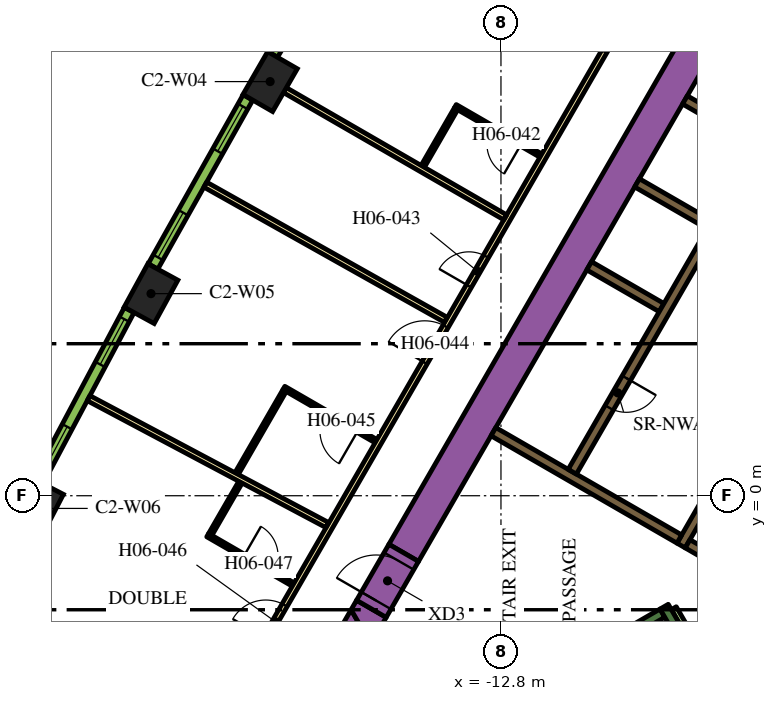
"""IFC4 building model, lengths in metres.
Left out: names, types, materials, properties, quantities, classifications, styles, units other than length and angle.
Written with IfcOpenShell. Run it as: python <this file> out.ifc"""

import sys

from ifc_helpers import new_model, si_unit, direction, frame, frame_2d, origin, origin_2d, place, context, subcontext, project, spatial, polyline, rectangle, outline, extrude, element, fill, save


model = new_model("IFC4")
c1 = context("Model", 3, precision=1e-05, world=origin(), true_north=direction((0.0, 1.0)))
c2 = subcontext(c1, "Body", "Model", "MODEL_VIEW")
j1 = project(units=[si_unit("LENGTHUNIT", "METRE"), si_unit("PLANEANGLEUNIT", "RADIAN")], contexts=[c1])
p1 = place(None, origin())
s1 = spatial("IfcSite", under=j1, at=p1, CompositionType="ELEMENT")
p2 = place(p1, origin())
s2 = spatial("IfcBuilding", under=s1, at=p2, CompositionType="ELEMENT")
p3 = place(p2, frame((0.0, 0.0, 91.5)))
s3 = spatial("IfcBuildingStorey", under=s2, at=p3, CompositionType="ELEMENT", Elevation=91.5)
for number, where, z_axis, x_axis in (
    (1, (-18.874, 10.897, 0.0), (0.0, 0.0, 1.0), (-0.5, -0.866, 0.0)),
    (2, (-22.009, 5.317, 0.0), (0.0, 0.0, 1.0), (-0.48, -0.877, 0.0)),
    (3, (-25.012, -0.334, 0.0), (0.0, 0.0, 1.0), (-0.459, -0.888, 0.0)),
):
    element("IfcColumn", number, at=place(p3, frame(where, z_axis=z_axis, x_axis=x_axis)), inside=s3, PredefinedType="COLUMN", context=c2, shape_type="SweptSolid", body=[
        extrude(rectangle(XDim=1.3, YDim=0.9, at=origin_2d()), origin(), (0.0, 0.0, 1.0), 3.9),
    ])
p4 = place(p3, frame((-15.36, -1.503, 0.0), z_axis=(0.0, 0.0, 1.0), x_axis=(0.50000389221, 0.866023156604, 0.0)))
e4 = element("IfcWall", 4, at=p4, inside=s3, PredefinedType="SOLIDWALL", context=c2, shape_type="SweptSolid", body=[
    extrude(rectangle(XDim=21.0, YDim=0.9, at=frame_2d((10.5, 0.0))), origin(), (0.0, 0.0, 1.0), 3.9),
])
p5 = place(p3, origin())
e5 = element("IfcWall", 5, at=p5, inside=s3, PredefinedType="SOLIDWALL", context=c2, shape_type="SweptSolid", body=[
    extrude(outline(polyline([(-16.489, -3.44), (-17.251, -3.88), (-16.743, -3.0), (-16.489, -3.44)])), origin(), (0.0, 0.0, 1.0), 3.9),
])
e6 = element("IfcWall", 6, at=p5, inside=s3, PredefinedType="SOLIDWALL", context=c2, shape_type="SweptSolid", body=[
    extrude(outline(polyline([(-15.82, -3.201), (-16.223, -3.9), (-16.743, -3.0), (-16.599, -2.751), (-15.82, -3.201)])), origin(), (0.0, 0.0, 1.0), 3.9),
])
p6 = place(p3, frame((-14.44, -6.49, 0.0), z_axis=(0.0, 0.0, 1.0), x_axis=(0.866022966069, 0.500004222222, 0.0)))
e7 = element("IfcWall", 7, at=p6, inside=s3, PredefinedType="SOLIDWALL", context=c2, shape_type="SweptSolid", body=[
    extrude(rectangle(XDim=6.8, YDim=0.25, at=frame_2d((3.4, 0.0))), origin(), (0.0, 0.0, 1.0), 3.9),
])
p7 = place(p3, frame((-8.168, -3.503, 0.0), z_axis=(0.0, 0.0, 1.0), x_axis=(-0.499952099219, 0.866053057547, 0.0)))
e8 = element("IfcWall", 8, at=p7, inside=s3, PredefinedType="SOLIDWALL", context=c2, shape_type="SweptSolid", body=[
    extrude(rectangle(XDim=0.675, YDim=0.25, at=frame_2d((0.337, 0.0))), origin(), (0.0, 0.0, 1.0), 3.9),
])
p8 = place(p3, frame((-8.06, -1.311, 0.0), z_axis=(0.0, 0.0, 1.0), x_axis=(0.50000273126, 0.866023826885, 0.0)))
e9 = element("IfcWall", 9, at=p8, inside=s3, PredefinedType="SOLIDWALL", context=c2, shape_type="SweptSolid", body=[
    extrude(rectangle(XDim=10.33, YDim=0.25, at=frame_2d((5.165, 0.0))), origin(), (0.0, 0.0, 1.0), 3.9),
])
e10 = element("IfcWall", 10, at=p5, inside=s3, PredefinedType="SOLIDWALL", context=c2, shape_type="SweptSolid", body=[
    extrude(outline(polyline([(-5.922, -2.257), (-5.922, -2.257), (-5.705, -2.382), (-5.83, -2.598), (-6.483, -2.221), (-6.591, -2.033), (-6.591, -2.033), (-6.7, -2.096), (-7.952, -1.373), (-7.827, -1.156), (-5.922, -2.257)])), origin(), (0.0, 0.0, 1.0), 3.9),
])
p9 = place(p3, frame((-8.106, -1.14, 0.0), z_axis=(0.0, 0.0, 1.0), x_axis=(-0.866000643155, 0.500042884217, 0.0)))
e11 = element("IfcWall", 11, at=p9, inside=s3, PredefinedType="SOLIDWALL", context=c2, shape_type="SweptSolid", body=[
    extrude(rectangle(XDim=5.65, YDim=0.25, at=frame_2d((2.825, 0.0))), origin(), (0.0, 0.0, 1.0), 3.9),
])
for number, where, z_axis, x_axis in (
    (12, (-8.574, 4.95, 0.0), (0.0, 0.0, 1.0), (-0.866, 0.5, 0.0)),
    (13, (-7.314, 7.132, 0.0), (0.0, 0.0, 1.0), (-0.866, 0.5, 0.0)),
):
    element("IfcWall", number, at=place(p3, frame(where, z_axis=z_axis, x_axis=x_axis)), inside=s3, PredefinedType="SOLIDWALL", context=c2, shape_type="SweptSolid", body=[
        extrude(rectangle(XDim=2.2, YDim=0.25, at=frame_2d((1.1, 0.0))), origin(), (0.0, 0.0, 1.0), 3.9),
    ])
p10 = place(p3, frame((-7.959, 10.415, 0.0), z_axis=(0.0, 0.0, 1.0), x_axis=(0.866020958405, -0.500007699544, 0.0)))
e14 = element("IfcWall", 14, at=p10, inside=s3, PredefinedType="SOLIDWALL", context=c2, shape_type="SweptSolid", body=[
    extrude(rectangle(XDim=4.1, YDim=0.25, at=frame_2d((2.05, 0.0))), origin(), (0.0, 0.0, 1.0), 3.9),
])
p11 = place(p3, frame((-8.252, -2.958, 0.0), z_axis=(0.0, 0.0, 1.0), x_axis=(0.500174715838, -0.865924508047, 0.0)))
e15 = element("IfcWall", 15, at=p11, inside=s3, PredefinedType="PARTITIONING", context=c2, shape_type="SweptSolid", body=[
    extrude(rectangle(XDim=0.514, YDim=0.15, at=frame_2d((0.257, 0.0))), origin(), (0.0, 0.0, 1.0), 2.75),
])
p12 = place(p3, frame((-6.008, 9.144, 0.0), z_axis=(0.0, 0.0, 1.0), x_axis=(-0.500006956611, -0.866021387346, 0.0)))
e16 = element("IfcWall", 16, at=p12, inside=s3, PredefinedType="SOLIDWALL", context=c2, shape_type="SweptSolid", body=[
    extrude(rectangle(XDim=9.83, YDim=0.25, at=frame_2d((4.915, 0.0))), origin(), (0.0, 0.0, 1.0), 3.9),
])
p13 = place(p12, frame((6.985, 0.0, 0.0)))
e17 = element("IfcOpeningElement", 17, at=p13, cuts=e16, PredefinedType="OPENING", context=c2, shape_type="SweptSolid", body=[
    extrude(rectangle(XDim=0.9, YDim=2.1, at=frame_2d((0.45, 1.05))), frame((0.0, 0.135, 0.0), z_axis=(0.0, -1.0, 0.0), x_axis=(1.0, 0.0, 0.0)), (0.0, 0.0, 1.0), 0.27),
])
p14 = place(p3, frame((-16.209, -2.976, 0.0), z_axis=(0.0, 0.0, 1.0), x_axis=(0.499954529098, 0.86605165483, 0.0)))
e18 = element("IfcWall", 18, at=p14, inside=s3, PredefinedType="SOLIDWALL", context=c2, shape_type="SweptSolid", body=[
    extrude(rectangle(XDim=1.7, YDim=0.9, at=frame_2d((0.85, 0.0))), origin(), (0.0, 0.0, 1.0), 3.9),
])
p15 = place(p14, frame((0.25, 0.0, 0.0)))
e19 = element("IfcOpeningElement", 19, at=p15, cuts=e18, PredefinedType="OPENING", context=c2, shape_type="SweptSolid", body=[
    extrude(rectangle(XDim=1.2, YDim=2.1, at=frame_2d((0.6, 1.05))), frame((0.0, 0.46, 0.0), z_axis=(0.0, -1.0, 0.0), x_axis=(1.0, 0.0, 0.0)), (0.0, 0.0, 1.0), 0.92),
])
p16 = place(p3, frame((-19.081, -3.9, 0.0), z_axis=(0.0, 0.0, 1.0), x_axis=(0.499998313975, 0.866026377209, 0.0)))
e20 = element("IfcWall", 20, at=p16, inside=s3, PredefinedType="PARTITIONING", context=c2, shape_type="SweptSolid", body=[
    extrude(rectangle(XDim=25.766, YDim=0.15, at=frame_2d((12.883, 0.0))), origin(), (0.0, 0.0, 1.0), 2.75),
])
p17 = place(p16, frame((19.306, 0.0, 0.0)))
e21 = element("IfcOpeningElement", 21, at=p17, cuts=e20, PredefinedType="OPENING", context=c2, shape_type="SweptSolid", body=[
    extrude(rectangle(XDim=1.0, YDim=2.1, at=frame_2d((0.5, 1.05))), frame((0.0, 0.085, 0.0), z_axis=(0.0, -1.0, 0.0), x_axis=(1.0, 0.0, 0.0)), (0.0, 0.0, 1.0), 0.17),
])
p18 = place(p16, frame((18.0, 0.0, 0.0)))
e22 = element("IfcOpeningElement", 22, at=p18, cuts=e20, PredefinedType="OPENING", context=c2, shape_type="SweptSolid", body=[
    extrude(rectangle(XDim=1.0, YDim=2.1, at=frame_2d((0.5, 1.05))), frame((0.0, 0.085, 0.0), z_axis=(0.0, -1.0, 0.0), x_axis=(1.0, 0.0, 0.0)), (0.0, 0.0, 1.0), 0.17),
])
p19 = place(p16, frame((10.874, 0.0, 0.0)))
e23 = element("IfcOpeningElement", 23, at=p19, cuts=e20, PredefinedType="OPENING", context=c2, shape_type="SweptSolid", body=[
    extrude(rectangle(XDim=0.9, YDim=2.1, at=frame_2d((0.45, 1.05))), frame((0.0, 0.085, 0.0), z_axis=(0.0, -1.0, 0.0), x_axis=(1.0, 0.0, 0.0)), (0.0, 0.0, 1.0), 0.17),
])
p20 = place(p16, frame((8.548, 0.0, 0.0)))
e24 = element("IfcOpeningElement", 24, at=p20, cuts=e20, PredefinedType="OPENING", context=c2, shape_type="SweptSolid", body=[
    extrude(rectangle(XDim=1.1, YDim=2.1, at=frame_2d((0.55, 1.05))), frame((0.0, 0.085, 0.0), z_axis=(0.0, -1.0, 0.0), x_axis=(1.0, 0.0, 0.0)), (0.0, 0.0, 1.0), 0.17),
])
p21 = place(p16, frame((0.18, 0.0, 0.0)))
e25 = element("IfcOpeningElement", 25, at=p21, cuts=e20, PredefinedType="OPENING", context=c2, shape_type="SweptSolid", body=[
    extrude(rectangle(XDim=1.0, YDim=2.1, at=frame_2d((0.5, 1.05))), frame((0.0, 0.085, 0.0), z_axis=(0.0, -1.0, 0.0), x_axis=(1.0, 0.0, 0.0)), (0.0, 0.0, 1.0), 0.17),
])
p22 = place(p3, frame((-23.652, 2.567, 0.0), z_axis=(0.0, 0.0, 1.0), x_axis=(0.883019237957, -0.469336793144, 0.0)))
e26 = element("IfcWall", 26, at=p22, inside=s3, PredefinedType="PARTITIONING", context=c2, shape_type="SweptSolid", body=[
    extrude(rectangle(XDim=7.111, YDim=0.15, at=frame_2d((3.555, 0.0))), origin(), (0.0, 0.0, 1.0), 2.75),
])
p23 = place(p3, frame((-26.591, -3.122, 0.0), z_axis=(0.0, 0.0, 1.0), x_axis=(0.893766213273, -0.448533115847, 0.0)))
e27 = element("IfcWall", 27, at=p23, inside=s3, PredefinedType="PARTITIONING", context=c2, shape_type="SweptSolid", body=[
    extrude(rectangle(XDim=10.875, YDim=0.15, at=frame_2d((5.438, 0.0))), origin(), (0.0, 0.0, 1.0), 2.75),
])
p24 = place(p3, frame((-20.581, 8.185, 0.0), z_axis=(0.0, 0.0, 1.0), x_axis=(0.871820720803, -0.489825102233, 0.0)))
e28 = element("IfcWall", 28, at=p24, inside=s3, PredefinedType="PARTITIONING", context=c2, shape_type="SweptSolid", body=[
    extrude(rectangle(XDim=7.257, YDim=0.15, at=frame_2d((3.628, 0.0))), origin(), (0.0, 0.0, 1.0), 2.75),
])
p25 = place(p3, frame((-18.484, 10.672, 0.0), z_axis=(0.0, 0.0, 1.0), x_axis=(0.866019162053, -0.50001081084, 0.0)))
e29 = element("IfcWall", 29, at=p25, inside=s3, PredefinedType="PARTITIONING", context=c2, shape_type="SweptSolid", body=[
    extrude(rectangle(XDim=6.694, YDim=0.15, at=frame_2d((3.347, 0.0))), origin(), (0.0, 0.0, 1.0), 2.75),
])
p26 = place(p3, frame((-11.75, 8.949, 0.0), z_axis=(0.0, 0.0, 1.0), x_axis=(-0.865997922154, 0.500047596559, 0.0)))
e30 = element("IfcWall", 30, at=p26, inside=s3, PredefinedType="PARTITIONING", context=c2, shape_type="SweptSolid", body=[
    extrude(rectangle(XDim=2.6, YDim=0.1, at=frame_2d((1.3, 0.0))), origin(), (0.0, 0.0, 1.0), 2.75),
])
p27 = place(p26, frame((0.6, 0.0, 0.0)))
e31 = element("IfcOpeningElement", 31, at=p27, cuts=e30, PredefinedType="OPENING", context=c2, shape_type="SweptSolid", body=[
    extrude(rectangle(XDim=0.9, YDim=2.1, at=frame_2d((0.45, 1.05))), frame((0.0, 0.06, 0.0), z_axis=(0.0, -1.0, 0.0), x_axis=(1.0, 0.0, 0.0)), (0.0, 0.0, 1.0), 0.12),
])
p28 = place(p3, frame((-13.983, 10.181, 0.0), z_axis=(0.0, 0.0, 1.0), x_axis=(-0.499980071345, -0.866036909293, 0.0)))
e32 = element("IfcWall", 32, at=p28, inside=s3, PredefinedType="PARTITIONING", context=c2, shape_type="SweptSolid", body=[
    extrude(rectangle(XDim=1.75, YDim=0.1, at=frame_2d((0.875, 0.0))), origin(), (0.0, 0.0, 1.0), 2.75),
])
p29 = place(p3, frame((-16.087, 1.436, 0.0), z_axis=(0.0, 0.0, 1.0), x_axis=(-0.866034573852, 0.49998411664, 0.0)))
e33 = element("IfcWall", 33, at=p29, inside=s3, PredefinedType="PARTITIONING", context=c2, shape_type="SweptSolid", body=[
    extrude(rectangle(XDim=2.8, YDim=0.1, at=frame_2d((1.4, 0.0))), origin(), (0.0, 0.0, 1.0), 2.75),
])
p30 = place(p29, frame((0.55, 0.0, 0.0)))
e34 = element("IfcOpeningElement", 34, at=p30, cuts=e33, PredefinedType="OPENING", context=c2, shape_type="SweptSolid", body=[
    extrude(rectangle(XDim=1.0, YDim=2.1, at=frame_2d((0.5, 1.05))), frame((0.0, 0.06, 0.0), z_axis=(0.0, -1.0, 0.0), x_axis=(1.0, 0.0, 0.0)), (0.0, 0.0, 1.0), 0.12),
])
p31 = place(p3, frame((-18.494, 2.768, 0.0), z_axis=(0.0, 0.0, 1.0), x_axis=(-0.500004791531, -0.866022637375, 0.0)))
e35 = element("IfcWall", 35, at=p31, inside=s3, PredefinedType="PARTITIONING", context=c2, shape_type="SweptSolid", body=[
    extrude(rectangle(XDim=2.52, YDim=0.1, at=frame_2d((1.26, 0.0))), origin(), (0.0, 0.0, 1.0), 2.75),
])
p32 = place(p3, frame((-20.518, -1.037, 0.0), z_axis=(0.0, 0.0, 1.0), x_axis=(0.866021400173, -0.500006934395, 0.0)))
e36 = element("IfcWall", 36, at=p32, inside=s3, PredefinedType="PARTITIONING", context=c2, shape_type="SweptSolid", body=[
    extrude(rectangle(XDim=2.6, YDim=0.1, at=frame_2d((1.3, 0.0))), origin(), (0.0, 0.0, 1.0), 2.75),
])
p33 = place(p32, frame((1.1, 0.0, 0.0)))
e37 = element("IfcOpeningElement", 37, at=p33, cuts=e36, PredefinedType="OPENING", context=c2, shape_type="SweptSolid", body=[
    extrude(rectangle(XDim=0.9, YDim=2.1, at=frame_2d((0.45, 1.05))), frame((0.0, 0.06, 0.0), z_axis=(0.0, -1.0, 0.0), x_axis=(1.0, 0.0, 0.0)), (0.0, 0.0, 1.0), 0.12),
])
p34 = place(p3, frame((-20.449, -1.019, 0.0), z_axis=(0.0, 0.0, 1.0), x_axis=(0.500061319399, 0.865989998118, 0.0)))
e38 = element("IfcWall", 38, at=p34, inside=s3, PredefinedType="PARTITIONING", context=c2, shape_type="SweptSolid", body=[
    extrude(rectangle(XDim=1.58, YDim=0.1, at=frame_2d((0.79, 0.0))), origin(), (0.0, 0.0, 1.0), 2.75),
])
p35 = place(p3, frame((-16.203, 15.998, 0.0), z_axis=(0.0, 0.0, 1.0), x_axis=(-0.510054281659, -0.860142214847, 0.0)))
e39 = element("IfcWall", 39, at=p35, inside=s3, PredefinedType="SOLIDWALL", context=c2, shape_type="SweptSolid", body=[
    extrude(rectangle(XDim=5.101, YDim=0.29, at=frame_2d((2.55, 0.0))), origin(), (0.0, 0.0, 1.0), 3.65),
])
p36 = place(p35, frame((0.273, 0.0, 0.9)))
e40 = element("IfcOpeningElement", 40, at=p36, cuts=e39, PredefinedType="OPENING", context=c2, shape_type="SweptSolid", body=[
    extrude(rectangle(XDim=1.35, YDim=2.15, at=frame_2d((0.675, 1.075))), frame((0.0, 0.155, 0.0), z_axis=(0.0, -1.0, 0.0), x_axis=(1.0, 0.0, 0.0)), (0.0, 0.0, 1.0), 0.31),
])
p37 = place(p35, frame((3.478, 0.0, 0.9)))
e41 = element("IfcOpeningElement", 41, at=p37, cuts=e39, PredefinedType="OPENING", context=c2, shape_type="SweptSolid", body=[
    extrude(rectangle(XDim=1.35, YDim=2.15, at=frame_2d((0.675, 1.075))), frame((0.0, 0.155, 0.0), z_axis=(0.0, -1.0, 0.0), x_axis=(1.0, 0.0, 0.0)), (0.0, 0.0, 1.0), 0.31),
])
p38 = place(p3, frame((-19.458, 10.48, 0.0), z_axis=(0.0, 0.0, 1.0), x_axis=(-0.48983164787, -0.87181704316, 0.0)))
e42 = element("IfcWall", 42, at=p38, inside=s3, PredefinedType="SOLIDWALL", context=c2, shape_type="SweptSolid", body=[
    extrude(rectangle(XDim=5.1, YDim=0.29, at=frame_2d((2.55, 0.0))), origin(), (0.0, 0.0, 1.0), 3.65),
])
p39 = place(p38, frame((0.272, 0.0, 0.9)))
e43 = element("IfcOpeningElement", 43, at=p39, cuts=e42, PredefinedType="OPENING", context=c2, shape_type="SweptSolid", body=[
    extrude(rectangle(XDim=1.35, YDim=2.15, at=frame_2d((0.675, 1.075))), frame((0.0, 0.155, 0.0), z_axis=(0.0, -1.0, 0.0), x_axis=(1.0, 0.0, 0.0)), (0.0, 0.0, 1.0), 0.31),
])
p40 = place(p38, frame((3.478, 0.0, 0.9)))
e44 = element("IfcOpeningElement", 44, at=p40, cuts=e42, PredefinedType="OPENING", context=c2, shape_type="SweptSolid", body=[
    extrude(rectangle(XDim=1.35, YDim=2.15, at=frame_2d((0.675, 1.075))), frame((0.0, 0.155, 0.0), z_axis=(0.0, -1.0, 0.0), x_axis=(1.0, 0.0, 0.0)), (0.0, 0.0, 1.0), 0.31),
])
p41 = place(p3, frame((-22.583, 4.887, 0.0), z_axis=(0.0, 0.0, 1.0), x_axis=(-0.469323203119, -0.883026461106, 0.0)))
e45 = element("IfcWall", 45, at=p41, inside=s3, PredefinedType="SOLIDWALL", context=c2, shape_type="SweptSolid", body=[
    extrude(rectangle(XDim=5.101, YDim=0.29, at=frame_2d((2.55, 0.0))), origin(), (0.0, 0.0, 1.0), 3.65),
])
p42 = place(p41, frame((0.273, 0.0, 0.9)))
e46 = element("IfcOpeningElement", 46, at=p42, cuts=e45, PredefinedType="OPENING", context=c2, shape_type="SweptSolid", body=[
    extrude(rectangle(XDim=1.35, YDim=2.15, at=frame_2d((0.675, 1.075))), frame((0.0, 0.155, 0.0), z_axis=(0.0, -1.0, 0.0), x_axis=(1.0, 0.0, 0.0)), (0.0, 0.0, 1.0), 0.31),
])
p43 = place(p41, frame((3.478, 0.0, 0.9)))
e47 = element("IfcOpeningElement", 47, at=p43, cuts=e45, PredefinedType="OPENING", context=c2, shape_type="SweptSolid", body=[
    extrude(rectangle(XDim=1.35, YDim=2.15, at=frame_2d((0.675, 1.075))), frame((0.0, 0.155, 0.0), z_axis=(0.0, -1.0, 0.0), x_axis=(1.0, 0.0, 0.0)), (0.0, 0.0, 1.0), 0.31),
])
p44 = place(p13, origin())
e48 = element("IfcDoor", 48, at=p44, inside=s3, OperationType="SINGLE_SWING_LEFT", PredefinedType="DOOR", context=c2, shape_type="SweptSolid", body=[
    extrude(rectangle(XDim=0.9, YDim=2.1, at=frame_2d((0.45, 1.05))), frame((0.0, 0.025, 0.0), z_axis=(0.0, -1.0, 0.0), x_axis=(1.0, 0.0, 0.0)), (0.0, 0.0, 1.0), 0.05),
])
fill(e17, e48)
p45 = place(p15, origin())
e49 = element("IfcDoor", 49, at=p45, inside=s3, OperationType="SINGLE_SWING_LEFT", PredefinedType="DOOR", context=c2, shape_type="SweptSolid", body=[
    extrude(rectangle(XDim=1.2, YDim=2.1, at=frame_2d((0.6, 1.05))), frame((0.0, 0.025, 0.0), z_axis=(0.0, -1.0, 0.0), x_axis=(1.0, 0.0, 0.0)), (0.0, 0.0, 1.0), 0.05),
])
fill(e19, e49)
p46 = place(p27, origin())
e50 = element("IfcDoor", 50, at=p46, inside=s3, OperationType="SINGLE_SWING_LEFT", PredefinedType="DOOR", context=c2, shape_type="SweptSolid", body=[
    extrude(rectangle(XDim=0.9, YDim=2.1, at=frame_2d((0.45, 1.05))), frame((0.0, 0.025, 0.0), z_axis=(0.0, -1.0, 0.0), x_axis=(1.0, 0.0, 0.0)), (0.0, 0.0, 1.0), 0.05),
])
fill(e31, e50)
p47 = place(p19, origin())
e51 = element("IfcDoor", 51, at=p47, inside=s3, OperationType="SINGLE_SWING_LEFT", PredefinedType="DOOR", context=c2, shape_type="SweptSolid", body=[
    extrude(rectangle(XDim=0.9, YDim=2.1, at=frame_2d((0.45, 1.05))), frame((0.0, 0.025, 0.0), z_axis=(0.0, -1.0, 0.0), x_axis=(1.0, 0.0, 0.0)), (0.0, 0.0, 1.0), 0.05),
])
fill(e23, e51)
p48 = place(p20, origin())
e52 = element("IfcDoor", 52, at=p48, inside=s3, OperationType="SINGLE_SWING_RIGHT", PredefinedType="DOOR", context=c2, shape_type="SweptSolid", body=[
    extrude(rectangle(XDim=1.1, YDim=2.1, at=frame_2d((0.55, 1.05))), frame((0.0, 0.025, 0.0), z_axis=(0.0, -1.0, 0.0), x_axis=(1.0, 0.0, 0.0)), (0.0, 0.0, 1.0), 0.05),
])
fill(e24, e52)
p49 = place(p30, origin())
e53 = element("IfcDoor", 53, at=p49, inside=s3, OperationType="SINGLE_SWING_RIGHT", PredefinedType="DOOR", context=c2, shape_type="SweptSolid", body=[
    extrude(rectangle(XDim=1.0, YDim=2.1, at=frame_2d((0.5, 1.05))), frame((0.0, 0.025, 0.0), z_axis=(0.0, -1.0, 0.0), x_axis=(1.0, 0.0, 0.0)), (0.0, 0.0, 1.0), 0.05),
])
fill(e34, e53)
p50 = place(p21, origin())
e54 = element("IfcDoor", 54, at=p50, inside=s3, OperationType="SINGLE_SWING_LEFT", PredefinedType="DOOR", context=c2, shape_type="SweptSolid", body=[
    extrude(rectangle(XDim=1.0, YDim=2.1, at=frame_2d((0.5, 1.05))), frame((0.0, 0.025, 0.0), z_axis=(0.0, -1.0, 0.0), x_axis=(1.0, 0.0, 0.0)), (0.0, 0.0, 1.0), 0.05),
])
fill(e25, e54)
p51 = place(p33, origin())
e55 = element("IfcDoor", 55, at=p51, inside=s3, OperationType="SINGLE_SWING_LEFT", PredefinedType="DOOR", context=c2, shape_type="SweptSolid", body=[
    extrude(rectangle(XDim=0.9, YDim=2.1, at=frame_2d((0.45, 1.05))), frame((0.0, 0.025, 0.0), z_axis=(0.0, -1.0, 0.0), x_axis=(1.0, 0.0, 0.0)), (0.0, 0.0, 1.0), 0.05),
])
fill(e37, e55)
p52 = place(p39, origin())
e56 = element("IfcWindow", 56, at=p52, inside=s3, PartitioningType="DOUBLE_PANEL_VERTICAL", PredefinedType="WINDOW", context=c2, shape_type="SweptSolid", body=[
    extrude(rectangle(XDim=1.35, YDim=2.15, at=frame_2d((0.675, 1.075))), frame((0.0, 0.015, 0.0), z_axis=(0.0, -1.0, 0.0), x_axis=(1.0, 0.0, 0.0)), (0.0, 0.0, 1.0), 0.06),
])
fill(e43, e56)
p53 = place(p40, origin())
e57 = element("IfcWindow", 57, at=p53, inside=s3, PartitioningType="DOUBLE_PANEL_VERTICAL", PredefinedType="WINDOW", context=c2, shape_type="SweptSolid", body=[
    extrude(rectangle(XDim=1.35, YDim=2.15, at=frame_2d((0.675, 1.075))), frame((0.0, 0.015, 0.0), z_axis=(0.0, -1.0, 0.0), x_axis=(1.0, 0.0, 0.0)), (0.0, 0.0, 1.0), 0.06),
])
fill(e44, e57)
p54 = place(p42, origin())
e58 = element("IfcWindow", 58, at=p54, inside=s3, PartitioningType="DOUBLE_PANEL_VERTICAL", PredefinedType="WINDOW", context=c2, shape_type="SweptSolid", body=[
    extrude(rectangle(XDim=1.35, YDim=2.15, at=frame_2d((0.675, 1.075))), frame((0.0, 0.015, 0.0), z_axis=(0.0, -1.0, 0.0), x_axis=(1.0, 0.0, 0.0)), (0.0, 0.0, 1.0), 0.06),
])
fill(e46, e58)
p55 = place(p43, origin())
e59 = element("IfcWindow", 59, at=p55, inside=s3, PartitioningType="DOUBLE_PANEL_VERTICAL", PredefinedType="WINDOW", context=c2, shape_type="SweptSolid", body=[
    extrude(rectangle(XDim=1.35, YDim=2.15, at=frame_2d((0.675, 1.075))), frame((0.0, 0.015, 0.0), z_axis=(0.0, -1.0, 0.0), x_axis=(1.0, 0.0, 0.0)), (0.0, 0.0, 1.0), 0.06),
])
fill(e47, e59)
save(model, sys.argv[1])
